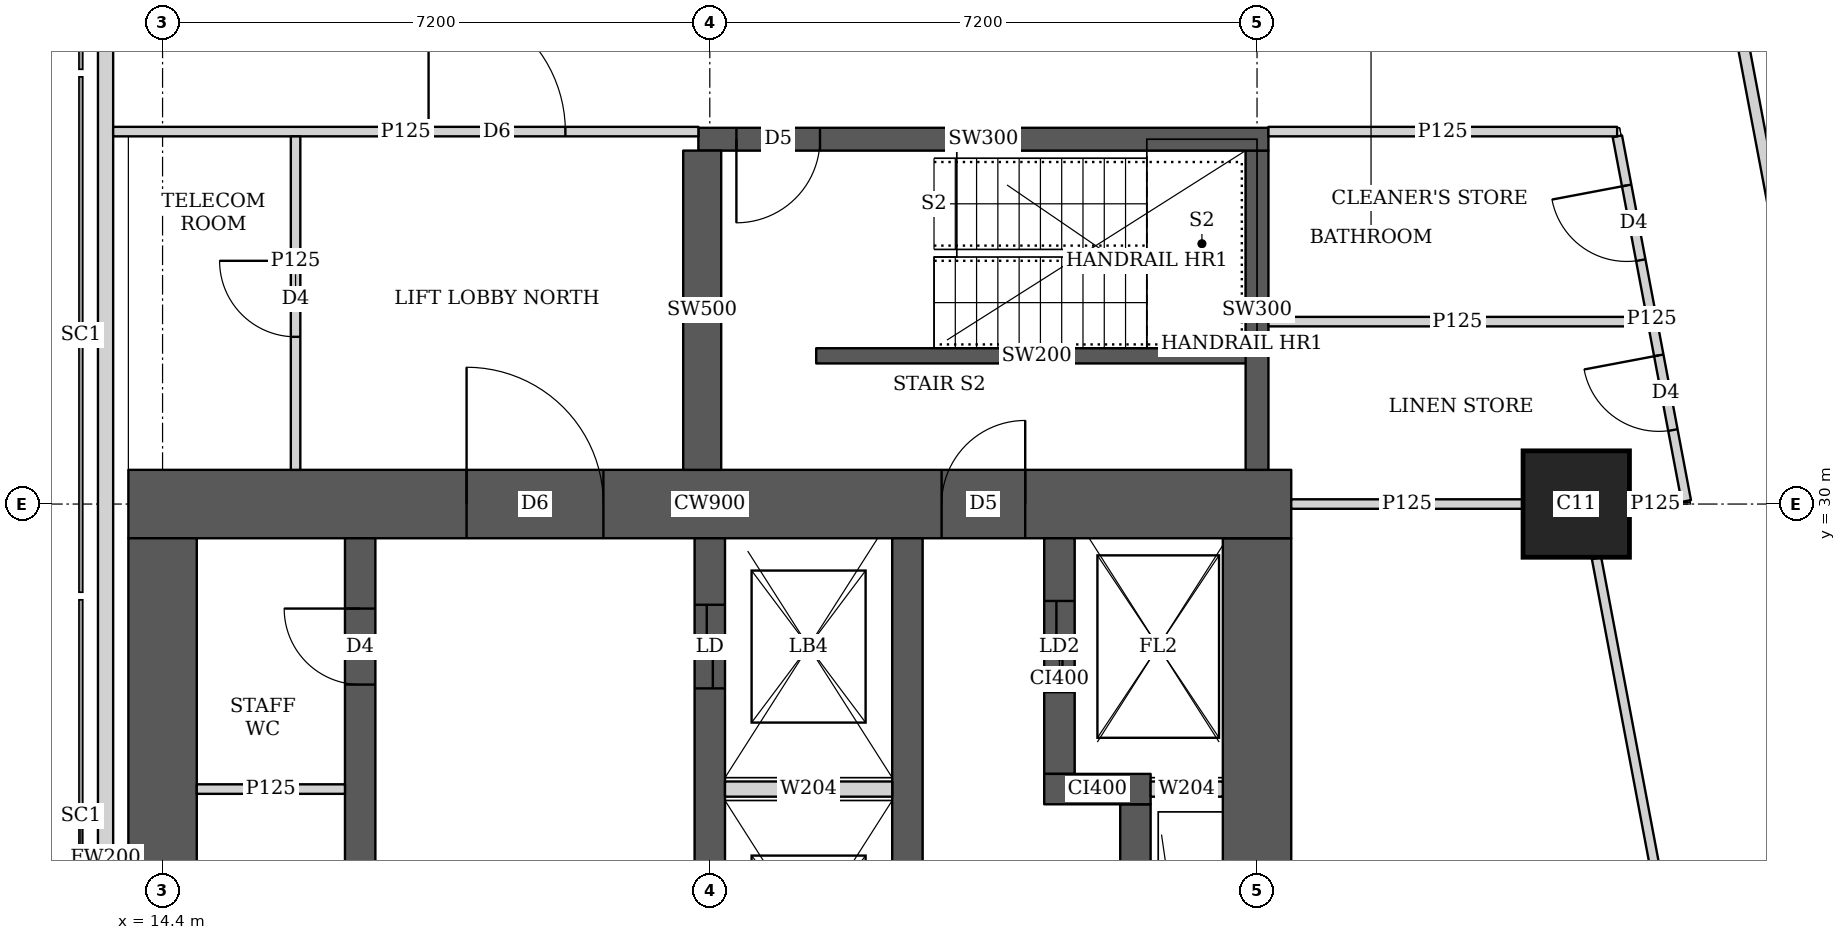
"""IFC4 building model, lengths in metres.
Left out: names, types, materials, properties, quantities, classifications, styles, units other than length and angle.
Written with IfcOpenShell. Run it as: python <this file> out.ifc"""

import sys

from ifc_helpers import new_model, si_unit, direction, frame, frame_2d, origin, origin_2d, place, context, subcontext, project, spatial, rectangle, extrude, element, fill, save


model = new_model("IFC4")
c1 = context("Model", 3, precision=1e-05, world=origin(), true_north=direction((0.0, 1.0)))
c2 = subcontext(c1, "Body", "Model", "MODEL_VIEW")
j1 = project(units=[si_unit("LENGTHUNIT", "METRE"), si_unit("PLANEANGLEUNIT", "RADIAN")], contexts=[c1])
p1 = place(None, origin())
s1 = spatial("IfcSite", under=j1, at=p1, CompositionType="ELEMENT")
p2 = place(p1, origin())
s2 = spatial("IfcBuilding", under=s1, at=p2, CompositionType="ELEMENT")
p3 = place(p2, frame((0.0, 0.0, 285.35)))
s3 = spatial("IfcBuildingStorey", under=s2, at=p3, CompositionType="ELEMENT", Elevation=285.35)
p4 = place(p3, frame((33.0, 30.0, 0.0), z_axis=(0.0, 0.0, 1.0), x_axis=(1.0, 0.0, 0.0)))
e1 = element("IfcColumn", 1, at=p4, inside=s3, PredefinedType="COLUMN", context=c2, shape_type="SweptSolid", body=[
    extrude(rectangle(XDim=1.4, YDim=1.4, at=origin_2d()), origin(), (0.0, 0.0, 1.0), 3.75),
])
p5 = place(p3, frame((13.95, 30.0, 0.0), z_axis=(0.0, 0.0, 1.0), x_axis=(1.0, 0.0, 0.0)))
e2 = element("IfcWall", 2, at=p5, inside=s3, PredefinedType="SHEAR", context=c2, shape_type="SweptSolid", body=[
    extrude(rectangle(XDim=15.3, YDim=0.9, at=frame_2d((7.65, 0.0))), origin(), (0.0, 0.0, 1.0), 3.75),
])
p6 = place(p5, frame((4.45, 0.0, 0.0)))
e3 = element("IfcOpeningElement", 3, at=p6, cuts=e2, PredefinedType="OPENING", context=c2, shape_type="SweptSolid", body=[
    extrude(rectangle(XDim=1.8, YDim=2.1, at=frame_2d((0.9, 1.05))), frame((0.0, 0.46, 0.0), z_axis=(0.0, -1.0, 0.0), x_axis=(1.0, 0.0, 0.0)), (0.0, 0.0, 1.0), 0.92),
])
p7 = place(p5, frame((10.7, 0.0, 0.0)))
e4 = element("IfcOpeningElement", 4, at=p7, cuts=e2, PredefinedType="OPENING", context=c2, shape_type="SweptSolid", body=[
    extrude(rectangle(XDim=1.1, YDim=2.1, at=frame_2d((0.55, 1.05))), frame((0.0, 0.46, 0.0), z_axis=(0.0, -1.0, 0.0), x_axis=(1.0, 0.0, 0.0)), (0.0, 0.0, 1.0), 0.92),
])
for number, where, z_axis, x_axis in (
    (5, (14.4, 15.45, 0.0), (0.0, 0.0, 1.0), (0.0, 1.0, 0.0)),
    (6, (28.8, 15.45, 0.0), (0.0, 0.0, 1.0), (0.0, 1.0, 0.0)),
):
    element("IfcWall", number, at=place(p3, frame(where, z_axis=z_axis, x_axis=x_axis)), inside=s3, PredefinedType="SHEAR", context=c2, shape_type="SweptSolid", body=[
        extrude(rectangle(XDim=14.1, YDim=0.9, at=frame_2d((7.05, 0.0))), origin(), (0.0, 0.0, 1.0), 3.75),
    ])
p8 = place(p3, frame((17.0, 15.45, 0.0), z_axis=(0.0, 0.0, 1.0), x_axis=(0.0, 1.0, 0.0)))
e7 = element("IfcWall", 7, at=p8, inside=s3, PredefinedType="SHEAR", context=c2, shape_type="SweptSolid", body=[
    extrude(rectangle(XDim=14.1, YDim=0.4, at=frame_2d((7.05, 0.0))), origin(), (0.0, 0.0, 1.0), 3.75),
])
p9 = place(p8, frame((1.05, 0.0, 0.0)))
e8 = element("IfcOpeningElement", 8, at=p9, cuts=e7, PredefinedType="OPENING", context=c2, shape_type="SweptSolid", body=[
    extrude(rectangle(XDim=1.0, YDim=2.1, at=frame_2d((0.5, 1.05))), frame((0.0, 0.21, 0.0), z_axis=(0.0, -1.0, 0.0), x_axis=(1.0, 0.0, 0.0)), (0.0, 0.0, 1.0), 0.42),
])
p10 = place(p8, frame((4.675, 0.0, 0.0)))
e9 = element("IfcOpeningElement", 9, at=p10, cuts=e7, PredefinedType="OPENING", context=c2, shape_type="SweptSolid", body=[
    extrude(rectangle(XDim=1.0, YDim=2.1, at=frame_2d((0.5, 1.05))), frame((0.0, 0.21, 0.0), z_axis=(0.0, -1.0, 0.0), x_axis=(1.0, 0.0, 0.0)), (0.0, 0.0, 1.0), 0.42),
])
p11 = place(p8, frame((8.425, 0.0, 0.0)))
e10 = element("IfcOpeningElement", 10, at=p11, cuts=e7, PredefinedType="OPENING", context=c2, shape_type="SweptSolid", body=[
    extrude(rectangle(XDim=1.0, YDim=2.1, at=frame_2d((0.5, 1.05))), frame((0.0, 0.21, 0.0), z_axis=(0.0, -1.0, 0.0), x_axis=(1.0, 0.0, 0.0)), (0.0, 0.0, 1.0), 0.42),
])
p12 = place(p8, frame((12.175, 0.0, 0.0)))
e11 = element("IfcOpeningElement", 11, at=p12, cuts=e7, PredefinedType="OPENING", context=c2, shape_type="SweptSolid", body=[
    extrude(rectangle(XDim=1.0, YDim=2.1, at=frame_2d((0.5, 1.05))), frame((0.0, 0.21, 0.0), z_axis=(0.0, -1.0, 0.0), x_axis=(1.0, 0.0, 0.0)), (0.0, 0.0, 1.0), 0.42),
])
p13 = place(p3, frame((21.6, 15.45, 0.0), z_axis=(0.0, 0.0, 1.0), x_axis=(0.0, 1.0, 0.0)))
e12 = element("IfcWall", 12, at=p13, inside=s3, PredefinedType="SHEAR", context=c2, shape_type="SweptSolid", body=[
    extrude(rectangle(XDim=14.1, YDim=0.4, at=frame_2d((7.05, 0.0))), origin(), (0.0, 0.0, 1.0), 3.75),
])
p14 = place(p13, frame((0.875, 0.0, 0.0)))
e13 = element("IfcOpeningElement", 13, at=p14, cuts=e12, PredefinedType="OPENING", context=c2, shape_type="SweptSolid", body=[
    extrude(rectangle(XDim=1.1, YDim=2.1, at=frame_2d((0.55, 1.05))), frame((0.0, 0.21, 0.0), z_axis=(0.0, -1.0, 0.0), x_axis=(1.0, 0.0, 0.0)), (0.0, 0.0, 1.0), 0.42),
])
p15 = place(p13, frame((4.625, 0.0, 0.0)))
e14 = element("IfcOpeningElement", 14, at=p15, cuts=e12, PredefinedType="OPENING", context=c2, shape_type="SweptSolid", body=[
    extrude(rectangle(XDim=1.1, YDim=2.1, at=frame_2d((0.55, 1.05))), frame((0.0, 0.21, 0.0), z_axis=(0.0, -1.0, 0.0), x_axis=(1.0, 0.0, 0.0)), (0.0, 0.0, 1.0), 0.42),
])
p16 = place(p13, frame((8.375, 0.0, 0.0)))
e15 = element("IfcOpeningElement", 15, at=p16, cuts=e12, PredefinedType="OPENING", context=c2, shape_type="SweptSolid", body=[
    extrude(rectangle(XDim=1.1, YDim=2.1, at=frame_2d((0.55, 1.05))), frame((0.0, 0.21, 0.0), z_axis=(0.0, -1.0, 0.0), x_axis=(1.0, 0.0, 0.0)), (0.0, 0.0, 1.0), 0.42),
])
p17 = place(p13, frame((12.125, 0.0, 0.0)))
e16 = element("IfcOpeningElement", 16, at=p17, cuts=e12, PredefinedType="OPENING", context=c2, shape_type="SweptSolid", body=[
    extrude(rectangle(XDim=1.1, YDim=2.1, at=frame_2d((0.55, 1.05))), frame((0.0, 0.21, 0.0), z_axis=(0.0, -1.0, 0.0), x_axis=(1.0, 0.0, 0.0)), (0.0, 0.0, 1.0), 0.42),
])
p18 = place(p3, frame((24.2, 15.45, 0.0), z_axis=(0.0, 0.0, 1.0), x_axis=(0.0, 1.0, 0.0)))
e17 = element("IfcWall", 17, at=p18, inside=s3, PredefinedType="SHEAR", context=c2, shape_type="SweptSolid", body=[
    extrude(rectangle(XDim=14.1, YDim=0.4, at=frame_2d((7.05, 0.0))), origin(), (0.0, 0.0, 1.0), 3.75),
])
p19 = place(p3, frame((27.2, 18.95, 0.0), z_axis=(0.0, 0.0, 1.0), x_axis=(0.0, 1.0, 0.0)))
e18 = element("IfcWall", 18, at=p19, inside=s3, PredefinedType="SHEAR", context=c2, shape_type="SweptSolid", body=[
    extrude(rectangle(XDim=7.1, YDim=0.4, at=frame_2d((3.55, 0.0))), origin(), (0.0, 0.0, 1.0), 3.75),
])
p20 = place(p3, frame((26.0, 26.25, 0.0), z_axis=(0.0, 0.0, 1.0), x_axis=(1.0, 0.0, 0.0)))
e19 = element("IfcWall", 19, at=p20, inside=s3, PredefinedType="SHEAR", context=c2, shape_type="SweptSolid", body=[
    extrude(rectangle(XDim=1.4, YDim=0.4, at=frame_2d((0.7, 0.0))), origin(), (0.0, 0.0, 1.0), 3.75),
])
p21 = place(p3, frame((26.2, 26.45, 0.0), z_axis=(0.0, 0.0, 1.0), x_axis=(0.0, 1.0, 0.0)))
e20 = element("IfcWall", 20, at=p21, inside=s3, PredefinedType="SHEAR", context=c2, shape_type="SweptSolid", body=[
    extrude(rectangle(XDim=3.1, YDim=0.4, at=frame_2d((1.55, 0.0))), origin(), (0.0, 0.0, 1.0), 3.75),
])
p22 = place(p21, frame((1.075, 0.0, 0.0)))
e21 = element("IfcOpeningElement", 21, at=p22, cuts=e20, PredefinedType="OPENING", context=c2, shape_type="SweptSolid", body=[
    extrude(rectangle(XDim=1.2, YDim=2.1, at=frame_2d((0.6, 1.05))), frame((0.0, 0.21, 0.0), z_axis=(0.0, -1.0, 0.0), x_axis=(1.0, 0.0, 0.0)), (0.0, 0.0, 1.0), 0.42),
])
p23 = place(p3, frame((21.45, 34.8, 0.0), z_axis=(0.0, 0.0, 1.0), x_axis=(1.0, 0.0, 0.0)))
e22 = element("IfcWall", 22, at=p23, inside=s3, PredefinedType="SHEAR", context=c2, shape_type="SweptSolid", body=[
    extrude(rectangle(XDim=7.5, YDim=0.3, at=frame_2d((3.75, 0.0))), origin(), (0.0, 0.0, 1.0), 3.75),
])
p24 = place(p23, frame((0.5, 0.0, 0.0)))
e23 = element("IfcOpeningElement", 23, at=p24, cuts=e22, PredefinedType="OPENING", context=c2, shape_type="SweptSolid", body=[
    extrude(rectangle(XDim=1.1, YDim=2.1, at=frame_2d((0.55, 1.05))), frame((0.0, 0.16, 0.0), z_axis=(0.0, -1.0, 0.0), x_axis=(1.0, 0.0, 0.0)), (0.0, 0.0, 1.0), 0.32),
])
p25 = place(p3, frame((21.5, 30.45, 0.0), z_axis=(0.0, 0.0, 1.0), x_axis=(0.0, 1.0, 0.0)))
e24 = element("IfcWall", 24, at=p25, inside=s3, PredefinedType="SHEAR", context=c2, shape_type="SweptSolid", body=[
    extrude(rectangle(XDim=4.2, YDim=0.5, at=frame_2d((2.1, 0.0))), origin(), (0.0, 0.0, 1.0), 3.75),
])
p26 = place(p3, frame((28.8, 30.45, 0.0), z_axis=(0.0, 0.0, 1.0), x_axis=(0.0, 1.0, 0.0)))
e25 = element("IfcWall", 25, at=p26, inside=s3, PredefinedType="SHEAR", context=c2, shape_type="SweptSolid", body=[
    extrude(rectangle(XDim=4.2, YDim=0.3, at=frame_2d((2.1, 0.0))), origin(), (0.0, 0.0, 1.0), 3.75),
])
p27 = place(p3, frame((13.65, 43.037, 0.0), z_axis=(0.0, 0.0, 1.0), x_axis=(0.0, -1.0, 0.0)))
e26 = element("IfcWall", 26, at=p27, inside=s3, PredefinedType="SOLIDWALL", context=c2, shape_type="SweptSolid", body=[
    extrude(rectangle(XDim=35.374, YDim=0.2, at=frame_2d((17.687, 0.0))), origin(), (0.0, 0.0, 1.0), 3.5),
])
p28 = place(p3, frame((34.036, 42.186, 0.0), z_axis=(0.0, 0.0, 1.0), x_axis=(0.185593518645, -0.9826266055, 0.0)))
e27 = element("IfcWall", 27, at=p28, inside=s3, PredefinedType="SOLIDWALL", context=c2, shape_type="SweptSolid", body=[
    extrude(rectangle(XDim=35.961, YDim=0.15, at=frame_2d((17.98, 0.0))), origin(), (0.0, 0.0, 1.0), 2.5),
])
p29 = place(p28, frame((19.345, 0.0, 0.0)))
e28 = element("IfcOpeningElement", 28, at=p29, cuts=e27, PredefinedType="OPENING", context=c2, shape_type="SweptSolid", body=[
    extrude(rectangle(XDim=1.0, YDim=2.1, at=frame_2d((0.5, 1.05))), frame((0.0, 0.085, 0.0), z_axis=(0.0, -1.0, 0.0), x_axis=(1.0, 0.0, 0.0)), (0.0, 0.0, 1.0), 0.17),
])
p30 = place(p28, frame((33.774, 0.0, 0.0)))
e29 = element("IfcOpeningElement", 29, at=p30, cuts=e27, PredefinedType="OPENING", context=c2, shape_type="SweptSolid", body=[
    extrude(rectangle(XDim=1.0, YDim=2.1, at=frame_2d((0.5, 1.05))), frame((0.0, 0.085, 0.0), z_axis=(0.0, -1.0, 0.0), x_axis=(1.0, 0.0, 0.0)), (0.0, 0.0, 1.0), 0.17),
])
p31 = place(p3, frame((13.75, 34.9, 0.0), z_axis=(0.0, 0.0, 1.0), x_axis=(1.0, 0.0, 0.0)))
e30 = element("IfcWall", 30, at=p31, inside=s3, PredefinedType="PARTITIONING", context=c2, shape_type="SweptSolid", body=[
    extrude(rectangle(XDim=7.7, YDim=0.125, at=frame_2d((3.85, 0.0))), origin(), (0.0, 0.0, 1.0), 3.5),
])
p32 = place(p31, frame((4.15, 0.0, 0.0)))
e31 = element("IfcOpeningElement", 31, at=p32, cuts=e30, PredefinedType="OPENING", context=c2, shape_type="SweptSolid", body=[
    extrude(rectangle(XDim=1.8, YDim=2.1, at=frame_2d((0.9, 1.05))), frame((0.0, 0.073, 0.0), z_axis=(0.0, -1.0, 0.0), x_axis=(1.0, 0.0, 0.0)), (0.0, 0.0, 1.0), 0.145),
])
p33 = place(p3, frame((16.15, 30.45, 0.0), z_axis=(0.0, 0.0, 1.0), x_axis=(0.0, 1.0, 0.0)))
e32 = element("IfcWall", 32, at=p33, inside=s3, PredefinedType="PARTITIONING", context=c2, shape_type="SweptSolid", body=[
    extrude(rectangle(XDim=4.387, YDim=0.125, at=frame_2d((2.193, 0.0))), origin(), (0.0, 0.0, 1.0), 3.5),
])
p34 = place(p33, frame((1.75, 0.0, 0.0)))
e33 = element("IfcOpeningElement", 33, at=p34, cuts=e32, PredefinedType="OPENING", context=c2, shape_type="SweptSolid", body=[
    extrude(rectangle(XDim=1.0, YDim=2.1, at=frame_2d((0.5, 1.05))), frame((0.0, 0.073, 0.0), z_axis=(0.0, -1.0, 0.0), x_axis=(1.0, 0.0, 0.0)), (0.0, 0.0, 1.0), 0.145),
])
p35 = place(p3, frame((28.95, 34.9, 0.0), z_axis=(0.0, 0.0, 1.0), x_axis=(1.0, 0.0, 0.0)))
e34 = element("IfcWall", 34, at=p35, inside=s3, PredefinedType="PARTITIONING", context=c2, shape_type="SweptSolid", body=[
    extrude(rectangle(XDim=4.588, YDim=0.125, at=frame_2d((2.294, 0.0))), origin(), (0.0, 0.0, 1.0), 3.5),
])
p36 = place(p3, frame((34.448, 30.04, 0.0), z_axis=(0.0, 0.0, 1.0), x_axis=(-0.185749459238, 0.982597139418, 0.0)))
e35 = element("IfcWall", 35, at=p36, inside=s3, PredefinedType="PARTITIONING", context=c2, shape_type="SweptSolid", body=[
    extrude(rectangle(XDim=4.883, YDim=0.125, at=frame_2d((2.441, 0.0))), origin(), (0.0, 0.0, 1.0), 2.5),
])
p37 = place(p36, frame((0.95, 0.0, 0.0)))
e36 = element("IfcOpeningElement", 36, at=p37, cuts=e35, PredefinedType="OPENING", context=c2, shape_type="SweptSolid", body=[
    extrude(rectangle(XDim=1.0, YDim=2.1, at=frame_2d((0.5, 1.05))), frame((0.0, 0.073, 0.0), z_axis=(0.0, -1.0, 0.0), x_axis=(1.0, 0.0, 0.0)), (0.0, 0.0, 1.0), 0.145),
])
p38 = place(p36, frame((3.225, 0.0, 0.0)))
e37 = element("IfcOpeningElement", 37, at=p38, cuts=e35, PredefinedType="OPENING", context=c2, shape_type="SweptSolid", body=[
    extrude(rectangle(XDim=1.0, YDim=2.1, at=frame_2d((0.5, 1.05))), frame((0.0, 0.073, 0.0), z_axis=(0.0, -1.0, 0.0), x_axis=(1.0, 0.0, 0.0)), (0.0, 0.0, 1.0), 0.145),
])
p39 = place(p3, frame((35.83, 15.713, 0.0), z_axis=(0.0, 0.0, 1.0), x_axis=(-0.185534724166, 0.982637708481, 0.0)))
e38 = element("IfcWall", 38, at=p39, inside=s3, PredefinedType="PARTITIONING", context=c2, shape_type="SweptSolid", body=[
    extrude(rectangle(XDim=13.814, YDim=0.125, at=frame_2d((6.907, 0.0))), origin(), (0.0, 0.0, 1.0), 2.5),
])
p40 = place(p39, frame((5.35, 0.0, 0.0)))
e39 = element("IfcOpeningElement", 39, at=p40, cuts=e38, PredefinedType="OPENING", context=c2, shape_type="SweptSolid", body=[
    extrude(rectangle(XDim=1.0, YDim=2.1, at=frame_2d((0.5, 1.05))), frame((0.0, 0.073, 0.0), z_axis=(0.0, -1.0, 0.0), x_axis=(1.0, 0.0, 0.0)), (0.0, 0.0, 1.0), 0.145),
])
p41 = place(p3, frame((29.25, 30.0, 0.0), z_axis=(0.0, 0.0, 1.0), x_axis=(1.0, 0.0, 0.0)))
e40 = element("IfcWall", 40, at=p41, inside=s3, PredefinedType="PARTITIONING", context=c2, shape_type="SweptSolid", body=[
    extrude(rectangle(XDim=3.049, YDim=0.125, at=frame_2d((1.524, 0.0))), origin(), (0.0, 0.0, 1.0), 3.5),
])
p42 = place(p3, frame((33.701, 30.0, 0.0), z_axis=(0.0, 0.0, 1.0), x_axis=(1.0, 0.0, 0.0)))
e41 = element("IfcWall", 41, at=p42, inside=s3, PredefinedType="PARTITIONING", context=c2, shape_type="SweptSolid", body=[
    extrude(rectangle(XDim=0.679, YDim=0.125, at=frame_2d((0.339, 0.0))), origin(), (0.0, 0.0, 1.0), 2.5),
])
p43 = place(p3, frame((28.95, 32.4, 0.0), z_axis=(0.0, 0.0, 1.0), x_axis=(1.0, 0.0, 0.0)))
e42 = element("IfcWall", 42, at=p43, inside=s3, PredefinedType="PARTITIONING", context=c2, shape_type="SweptSolid", body=[
    extrude(rectangle(XDim=4.976, YDim=0.125, at=frame_2d((2.488, 0.0))), origin(), (0.0, 0.0, 1.0), 3.5),
])
p44 = place(p3, frame((14.85, 26.25, 0.0), z_axis=(0.0, 0.0, 1.0), x_axis=(1.0, 0.0, 0.0)))
e43 = element("IfcWall", 43, at=p44, inside=s3, PredefinedType="PARTITIONING", context=c2, shape_type="SweptSolid", body=[
    extrude(rectangle(XDim=1.95, YDim=0.125, at=frame_2d((0.975, 0.0))), origin(), (0.0, 0.0, 1.0), 3.5),
])
p45 = place(p3, frame((23.0, 31.95, 0.0), z_axis=(0.0, 0.0, 1.0), x_axis=(1.0, 0.0, 0.0)))
e44 = element("IfcWall", 44, at=p45, inside=s3, PredefinedType="SHEAR", context=c2, shape_type="SweptSolid", body=[
    extrude(rectangle(XDim=5.8, YDim=0.2, at=frame_2d((2.9, 0.0))), origin(), (0.0, 0.0, 1.0), 3.75),
])
p46 = place(p3, frame((21.8, 26.25, 0.0), z_axis=(0.0, 0.0, 1.0), x_axis=(1.0, 0.0, 0.0)))
e45 = element("IfcWall", 45, at=p46, inside=s3, PredefinedType="SOLIDWALL", context=c2, shape_type="SweptSolid", body=[
    extrude(rectangle(XDim=2.2, YDim=0.2, at=frame_2d((1.1, 0.0))), origin(), (0.0, 0.0, 1.0), 3.5),
])
p47 = place(p3, frame((27.4, 26.25, 0.0), z_axis=(0.0, 0.0, 1.0), x_axis=(1.0, 0.0, 0.0)))
e46 = element("IfcWall", 46, at=p47, inside=s3, PredefinedType="SOLIDWALL", context=c2, shape_type="SweptSolid", body=[
    extrude(rectangle(XDim=0.95, YDim=0.2, at=frame_2d((0.475, 0.0))), origin(), (0.0, 0.0, 1.0), 3.5),
])
p48 = place(p34, origin())
e47 = element("IfcDoor", 47, at=p48, inside=s3, OperationType="SINGLE_SWING_RIGHT", PredefinedType="DOOR", context=c2, shape_type="SweptSolid", body=[
    extrude(rectangle(XDim=1.0, YDim=2.1, at=frame_2d((0.5, 1.05))), frame((0.0, 0.025, 0.0), z_axis=(0.0, -1.0, 0.0), x_axis=(1.0, 0.0, 0.0)), (0.0, 0.0, 1.0), 0.05),
])
fill(e33, e47)
p49 = place(p32, origin())
e48 = element("IfcDoor", 48, at=p49, inside=s3, OperationType="DOUBLE_DOOR_SINGLE_SWING", PredefinedType="DOOR", context=c2, shape_type="SweptSolid", body=[
    extrude(rectangle(XDim=1.8, YDim=2.1, at=frame_2d((0.9, 1.05))), frame((0.0, 0.025, 0.0), z_axis=(0.0, -1.0, 0.0), x_axis=(1.0, 0.0, 0.0)), (0.0, 0.0, 1.0), 0.05),
])
fill(e31, e48)
p50 = place(p37, origin())
e49 = element("IfcDoor", 49, at=p50, inside=s3, OperationType="SINGLE_SWING_RIGHT", PredefinedType="DOOR", context=c2, shape_type="SweptSolid", body=[
    extrude(rectangle(XDim=1.0, YDim=2.1, at=frame_2d((0.5, 1.05))), frame((0.0, 0.025, 0.0), z_axis=(0.0, -1.0, 0.0), x_axis=(1.0, 0.0, 0.0)), (0.0, 0.0, 1.0), 0.05),
])
fill(e36, e49)
p51 = place(p38, origin())
e50 = element("IfcDoor", 50, at=p51, inside=s3, OperationType="SINGLE_SWING_RIGHT", PredefinedType="DOOR", context=c2, shape_type="SweptSolid", body=[
    extrude(rectangle(XDim=1.0, YDim=2.1, at=frame_2d((0.5, 1.05))), frame((0.0, 0.025, 0.0), z_axis=(0.0, -1.0, 0.0), x_axis=(1.0, 0.0, 0.0)), (0.0, 0.0, 1.0), 0.05),
])
fill(e37, e50)
p52 = place(p12, origin())
e51 = element("IfcDoor", 51, at=p52, inside=s3, OperationType="SINGLE_SWING_RIGHT", PredefinedType="DOOR", context=c2, shape_type="SweptSolid", body=[
    extrude(rectangle(XDim=1.0, YDim=2.1, at=frame_2d((0.5, 1.05))), frame((0.0, 0.025, 0.0), z_axis=(0.0, -1.0, 0.0), x_axis=(1.0, 0.0, 0.0)), (0.0, 0.0, 1.0), 0.05),
])
fill(e11, e51)
p53 = place(p6, origin())
e52 = element("IfcDoor", 52, at=p53, inside=s3, OperationType="DOUBLE_DOOR_SINGLE_SWING", PredefinedType="DOOR", context=c2, shape_type="SweptSolid", body=[
    extrude(rectangle(XDim=1.8, YDim=2.1, at=frame_2d((0.9, 1.05))), frame((0.0, 0.025, 0.0), z_axis=(0.0, -1.0, 0.0), x_axis=(1.0, 0.0, 0.0)), (0.0, 0.0, 1.0), 0.05),
])
fill(e3, e52)
p54 = place(p7, origin())
e53 = element("IfcDoor", 53, at=p54, inside=s3, OperationType="SINGLE_SWING_RIGHT", PredefinedType="DOOR", context=c2, shape_type="SweptSolid", body=[
    extrude(rectangle(XDim=1.1, YDim=2.1, at=frame_2d((0.55, 1.05))), frame((0.0, 0.025, 0.0), z_axis=(0.0, -1.0, 0.0), x_axis=(1.0, 0.0, 0.0)), (0.0, 0.0, 1.0), 0.05),
])
fill(e4, e53)
p55 = place(p22, origin())
e54 = element("IfcDoor", 54, at=p55, inside=s3, OperationType="DOUBLE_DOOR_SLIDING", PredefinedType="DOOR", context=c2, shape_type="SweptSolid", body=[
    extrude(rectangle(XDim=1.2, YDim=2.1, at=frame_2d((0.6, 1.05))), frame((0.0, 0.025, 0.0), z_axis=(0.0, -1.0, 0.0), x_axis=(1.0, 0.0, 0.0)), (0.0, 0.0, 1.0), 0.05),
])
fill(e21, e54)
p56 = place(p17, origin())
e55 = element("IfcDoor", 55, at=p56, inside=s3, OperationType="DOUBLE_DOOR_SLIDING", PredefinedType="DOOR", context=c2, shape_type="SweptSolid", body=[
    extrude(rectangle(XDim=1.1, YDim=2.1, at=frame_2d((0.55, 1.05))), frame((0.0, 0.025, 0.0), z_axis=(0.0, -1.0, 0.0), x_axis=(1.0, 0.0, 0.0)), (0.0, 0.0, 1.0), 0.05),
])
fill(e16, e55)
p57 = place(p24, origin())
e56 = element("IfcDoor", 56, at=p57, inside=s3, OperationType="SINGLE_SWING_RIGHT", PredefinedType="DOOR", context=c2, shape_type="SweptSolid", body=[
    extrude(rectangle(XDim=1.1, YDim=2.1, at=frame_2d((0.55, 1.05))), frame((0.0, 0.025, 0.0), z_axis=(0.0, -1.0, 0.0), x_axis=(1.0, 0.0, 0.0)), (0.0, 0.0, 1.0), 0.05),
])
fill(e23, e56)
save(model, sys.argv[1])
